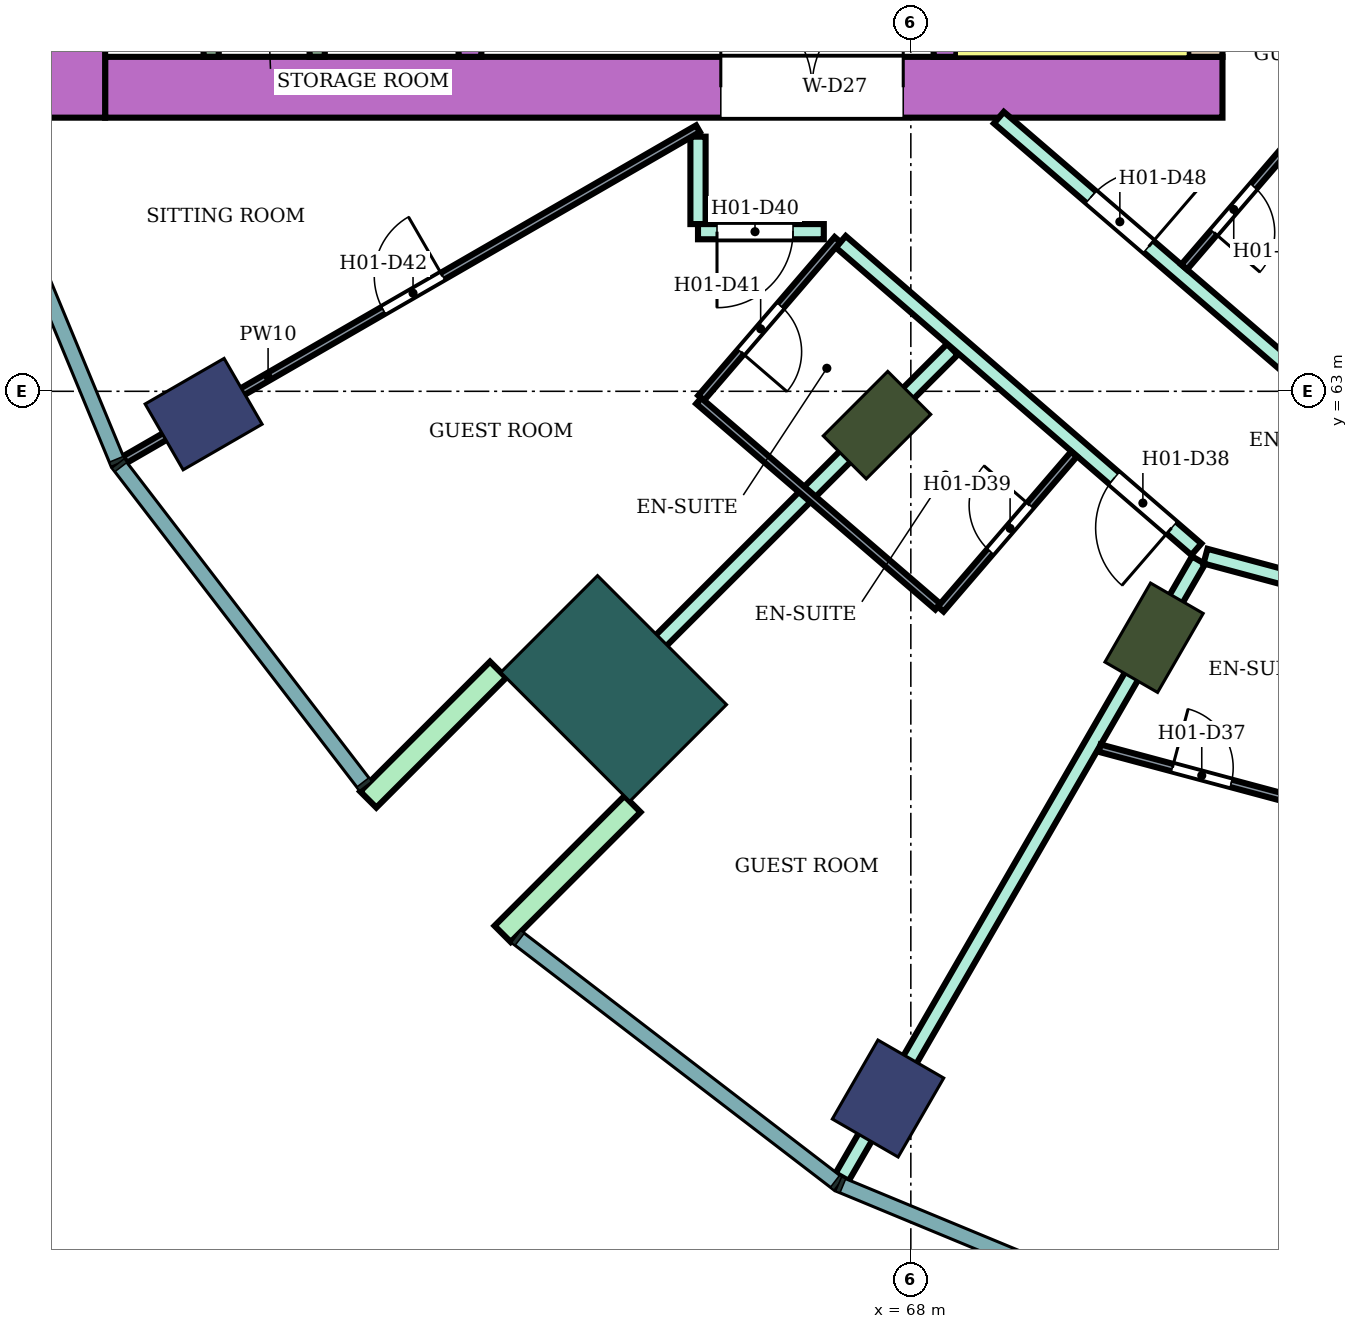
"""IFC4 building model, lengths in metres.
Left out: names, types, materials, properties, quantities, classifications, styles, units other than length and angle.
Written with IfcOpenShell. Run it as: python <this file> out.ifc"""

import sys

from ifc_helpers import new_model, si_unit, direction, frame, frame_2d, origin, origin_2d, place, context, subcontext, project, spatial, rectangle, extrude, element, fill, save


model = new_model("IFC4")
c1 = context("Model", 3, precision=1e-05, world=origin(), true_north=direction((0.0, 1.0)))
c2 = subcontext(c1, "Body", "Model", "MODEL_VIEW")
j1 = project(units=[si_unit("LENGTHUNIT", "METRE"), si_unit("PLANEANGLEUNIT", "RADIAN")], contexts=[c1])
p1 = place(None, origin())
s1 = spatial("IfcSite", under=j1, at=p1, CompositionType="ELEMENT")
p2 = place(p1, origin())
s2 = spatial("IfcBuilding", under=s1, at=p2, CompositionType="ELEMENT")
p3 = place(p2, frame((0.0, 0.0, 32.6)))
s3 = spatial("IfcBuildingStorey", under=s2, at=p3, CompositionType="ELEMENT", Elevation=32.6)
for number, where, z_axis, x_axis in (
    (1, (58.696, 62.7, 0.0), (0.0, 0.0, 1.0), (-0.866, -0.5, 0.0)),
    (2, (67.7, 53.696, 0.0), (0.0, 0.0, 1.0), (-0.5, -0.866, 0.0)),
):
    element("IfcColumn", number, at=place(p3, frame(where, z_axis=z_axis, x_axis=x_axis)), inside=s3, PredefinedType="COLUMN", context=c2, shape_type="SweptSolid", body=[
        extrude(rectangle(XDim=1.2, YDim=1.0, at=origin_2d()), origin(), (0.0, 0.0, 1.0), 3.8),
    ])
for number, where, z_axis, x_axis in (
    (3, (67.555, 62.555, 0.0), (0.0, 0.0, 1.0), (-0.707, -0.707, 0.0)),
    (4, (71.2, 59.758, 0.0), (0.0, 0.0, 1.0), (-0.5, -0.866, 0.0)),
):
    element("IfcColumn", number, at=place(p3, frame(where, z_axis=z_axis, x_axis=x_axis)), inside=s3, PredefinedType="COLUMN", context=c2, shape_type="SweptSolid", body=[
        extrude(rectangle(XDim=1.2, YDim=0.8, at=origin_2d()), origin(), (0.0, 0.0, 1.0), 3.8),
    ])
p4 = place(p3, frame((64.09, 59.09, 0.0), z_axis=(0.0, 0.0, 1.0), x_axis=(-0.707106781187, -0.707106781187, 0.0)))
e5 = element("IfcColumn", 5, at=p4, inside=s3, PredefinedType="COLUMN", context=c2, shape_type="SweptSolid", body=[
    extrude(rectangle(XDim=1.8, YDim=2.4, at=origin_2d()), origin(), (0.0, 0.0, 1.0), 3.8),
])
p5 = place(p3, frame((72.1, 67.0, 0.0), z_axis=(0.0, 0.0, 1.0), x_axis=(-1.0, 0.0, 0.0)))
e6 = element("IfcWall", 6, at=p5, inside=s3, PredefinedType="SHEAR", context=c2, shape_type="SweptSolid", body=[
    extrude(rectangle(XDim=14.7, YDim=0.8, at=frame_2d((7.35, 0.0))), origin(), (0.0, 0.0, 1.0), 3.48),
])
p6 = place(p5, frame((4.2, 0.0, 0.0)))
e7 = element("IfcOpeningElement", 7, at=p6, cuts=e6, PredefinedType="OPENING", context=c2, shape_type="SweptSolid", body=[
    extrude(rectangle(XDim=2.4, YDim=2.4, at=frame_2d((1.2, 1.2))), frame((0.0, 0.41, 0.0), z_axis=(0.0, -1.0, 0.0), x_axis=(1.0, 0.0, 0.0)), (0.0, 0.0, 1.0), 0.82),
])
p7 = place(p3, frame((71.875, 75.0, 0.0), z_axis=(0.0, 0.0, 1.0), x_axis=(0.0, -1.0, 0.0)))
e8 = element("IfcWall", 8, at=p7, inside=s3, PredefinedType="SHEAR", context=c2, shape_type="SweptSolid", body=[
    extrude(rectangle(XDim=7.6, YDim=0.45, at=frame_2d((3.8, 0.0))), origin(), (0.0, 0.0, 1.0), 3.48),
])
p8 = place(p3, frame((57.0, 83.4, 0.0), z_axis=(0.0, 0.0, 1.0), x_axis=(0.0, -1.0, 0.0)))
e9 = element("IfcWall", 9, at=p8, inside=s3, PredefinedType="SHEAR", context=c2, shape_type="SweptSolid", body=[
    extrude(rectangle(XDim=16.8, YDim=0.8, at=frame_2d((8.4, 0.0))), origin(), (0.0, 0.0, 1.0), 3.48),
])
p9 = place(p3, frame((68.45, 75.0, 0.0), z_axis=(0.0, 0.0, 1.0), x_axis=(0.0, -1.0, 0.0)))
e10 = element("IfcWall", 10, at=p9, inside=s3, PredefinedType="SHEAR", context=c2, shape_type="SweptSolid", body=[
    extrude(rectangle(XDim=7.6, YDim=0.3, at=frame_2d((3.8, 0.0))), origin(), (0.0, 0.0, 1.0), 3.48),
])
p10 = place(p9, frame((1.85, 0.0, 0.0)))
e11 = element("IfcOpeningElement", 11, at=p10, cuts=e10, PredefinedType="OPENING", context=c2, shape_type="SweptSolid", body=[
    extrude(rectangle(XDim=0.9, YDim=2.1, at=frame_2d((0.45, 1.05))), frame((0.0, 0.16, 0.0), z_axis=(0.0, -1.0, 0.0), x_axis=(1.0, 0.0, 0.0)), (0.0, 0.0, 1.0), 0.32),
])
p11 = place(p3, frame((62.2, 71.4, 0.0), z_axis=(0.0, 0.0, 1.0), x_axis=(0.0, -1.0, 0.0)))
e12 = element("IfcWall", 12, at=p11, inside=s3, PredefinedType="SHEAR", context=c2, shape_type="SweptSolid", body=[
    extrude(rectangle(XDim=4.0, YDim=0.3, at=frame_2d((2.0, 0.0))), origin(), (0.0, 0.0, 1.0), 3.48),
])
for number, where, z_axis, x_axis in (
    (13, (62.57, 59.338, 0.0), (0.0, 0.0, 1.0), (-0.707, -0.707, 0.0)),
    (14, (64.338, 57.57, 0.0), (0.0, 0.0, 1.0), (-0.707, -0.707, 0.0)),
):
    element("IfcWall", number, at=place(p3, frame(where, z_axis=z_axis, x_axis=x_axis)), inside=s3, PredefinedType="NOTDEFINED", context=c2, shape_type="SweptSolid", body=[
        extrude(rectangle(XDim=2.416, YDim=0.3, at=frame_2d((1.208, 0.0))), origin(), (0.0, 0.0, 1.0), 3.8),
    ])
p12 = place(p3, frame((63.592, 58.599, 0.0), z_axis=(0.0, 0.0, 1.0), x_axis=(0.707228748718, 0.706984792613, 0.0)))
e15 = element("IfcWall", 15, at=p12, inside=s3, PredefinedType="PARTITIONING", context=c2, shape_type="SweptSolid", body=[
    extrude(rectangle(XDim=7.005, YDim=0.2, at=frame_2d((3.503, 0.0))), origin(), (0.0, 0.0, 1.0), 3.35),
])
p13 = place(p3, frame((65.2, 65.2, 0.0), z_axis=(0.0, 0.0, 1.0), x_axis=(0.0, 1.0, 0.0)))
e16 = element("IfcWall", 16, at=p13, inside=s3, PredefinedType="PARTITIONING", context=c2, shape_type="SweptSolid", body=[
    extrude(rectangle(XDim=1.15, YDim=0.2, at=frame_2d((0.575, 0.0))), origin(), (0.0, 0.0, 1.0), 3.35),
])
p14 = place(p3, frame((65.2, 65.1, 0.0), z_axis=(0.0, 0.0, 1.0), x_axis=(1.0, 0.0, 0.0)))
e17 = element("IfcWall", 17, at=p14, inside=s3, PredefinedType="PARTITIONING", context=c2, shape_type="SweptSolid", body=[
    extrude(rectangle(XDim=1.655, YDim=0.2, at=frame_2d((0.828, 0.0))), origin(), (0.0, 0.0, 1.0), 3.35),
])
p15 = place(p14, frame((0.25, 0.0, 0.0)))
e18 = element("IfcOpeningElement", 18, at=p15, cuts=e17, PredefinedType="OPENING", context=c2, shape_type="SweptSolid", body=[
    extrude(rectangle(XDim=1.0, YDim=2.1, at=frame_2d((0.5, 1.05))), frame((0.0, 0.11, 0.0), z_axis=(0.0, -1.0, 0.0), x_axis=(1.0, 0.0, 0.0)), (0.0, 0.0, 1.0), 0.22),
])
p16 = place(p3, frame((67.078, 64.968, 0.0), z_axis=(0.0, 0.0, 1.0), x_axis=(0.756371089567, -0.654142778656, 0.0)))
e19 = element("IfcWall", 19, at=p16, inside=s3, PredefinedType="PARTITIONING", context=c2, shape_type="SweptSolid", body=[
    extrude(rectangle(XDim=6.185, YDim=0.2, at=frame_2d((3.093, 0.0))), origin(), (0.0, 0.0, 1.0), 3.35),
])
p17 = place(p16, frame((4.755, 0.0, 0.0)))
e20 = element("IfcOpeningElement", 20, at=p17, cuts=e19, PredefinedType="OPENING", context=c2, shape_type="SweptSolid", body=[
    extrude(rectangle(XDim=1.0, YDim=2.1, at=frame_2d((0.5, 1.05))), frame((0.0, 0.11, 0.0), z_axis=(0.0, -1.0, 0.0), x_axis=(1.0, 0.0, 0.0)), (0.0, 0.0, 1.0), 0.22),
])
p18 = place(p3, frame((67.096, 52.662, 0.0), z_axis=(0.0, 0.0, 1.0), x_axis=(0.500242450002, 0.865885379953, 0.0)))
e21 = element("IfcWall", 21, at=p18, inside=s3, PredefinedType="PARTITIONING", context=c2, shape_type="SweptSolid", body=[
    extrude(rectangle(XDim=9.374, YDim=0.2, at=frame_2d((4.687, 0.0))), origin(), (0.0, 0.0, 1.0), 3.35),
])
p19 = place(p3, frame((69.158, 66.6, 0.0), z_axis=(0.0, 0.0, 1.0), x_axis=(0.757976058094, -0.652282373943, 0.0)))
e22 = element("IfcWall", 22, at=p19, inside=s3, PredefinedType="PARTITIONING", context=c2, shape_type="SweptSolid", body=[
    extrude(rectangle(XDim=5.16, YDim=0.2, at=frame_2d((2.58, 0.0))), origin(), (0.0, 0.0, 1.0), 3.35),
])
p20 = place(p19, frame((1.6, 0.0, 0.0)))
e23 = element("IfcOpeningElement", 23, at=p20, cuts=e22, PredefinedType="OPENING", context=c2, shape_type="SweptSolid", body=[
    extrude(rectangle(XDim=1.0, YDim=2.1, at=frame_2d((0.5, 1.05))), frame((0.0, 0.11, 0.0), z_axis=(0.0, -1.0, 0.0), x_axis=(1.0, 0.0, 0.0)), (0.0, 0.0, 1.0), 0.22),
])
p21 = place(p3, frame((71.877, 60.831, 0.0), z_axis=(0.0, 0.0, 1.0), x_axis=(0.965852509869, -0.259092510851, 0.0)))
e24 = element("IfcWall", 24, at=p21, inside=s3, PredefinedType="PARTITIONING", context=c2, shape_type="SweptSolid", body=[
    extrude(rectangle(XDim=8.32, YDim=0.2, at=frame_2d((4.16, 0.0))), origin(), (0.0, 0.0, 1.0), 3.35),
])
p22 = place(p21, frame((6.86, 0.0, 0.0)))
e25 = element("IfcOpeningElement", 25, at=p22, cuts=e24, PredefinedType="OPENING", context=c2, shape_type="SweptSolid", body=[
    extrude(rectangle(XDim=1.0, YDim=2.1, at=frame_2d((0.5, 1.05))), frame((0.0, 0.11, 0.0), z_axis=(0.0, -1.0, 0.0), x_axis=(1.0, 0.0, 0.0)), (0.0, 0.0, 1.0), 0.22),
])
p23 = place(p3, frame((57.659, 62.101, 0.0), z_axis=(0.0, 0.0, 1.0), x_axis=(0.86602264145, 0.500004784474, 0.0)))
e26 = element("IfcWall", 26, at=p23, inside=s3, PredefinedType="PARTITIONING", context=c2, shape_type="SweptSolid", body=[
    extrude(rectangle(XDim=8.708, YDim=0.1, at=frame_2d((4.354, 0.0))), origin(), (0.0, 0.0, 1.0), 3.35),
])
p24 = place(p23, frame((3.929, 0.0, 0.0)))
e27 = element("IfcOpeningElement", 27, at=p24, cuts=e26, PredefinedType="OPENING", context=c2, shape_type="SweptSolid", body=[
    extrude(rectangle(XDim=0.9, YDim=2.1, at=frame_2d((0.45, 1.05))), frame((0.0, 0.06, 0.0), z_axis=(0.0, -1.0, 0.0), x_axis=(1.0, 0.0, 0.0)), (0.0, 0.0, 1.0), 0.12),
])
p25 = place(p3, frame((65.242, 62.912, 0.0), z_axis=(0.0, 0.0, 1.0), x_axis=(0.652069888227, 0.758158862553, 0.0)))
e28 = element("IfcWall", 28, at=p25, inside=s3, PredefinedType="PARTITIONING", context=c2, shape_type="SweptSolid", body=[
    extrude(rectangle(XDim=2.75, YDim=0.1, at=frame_2d((1.375, 0.0))), origin(), (0.0, 0.0, 1.0), 3.35),
])
p26 = place(p25, frame((0.8, 0.0, 0.0)))
e29 = element("IfcOpeningElement", 29, at=p26, cuts=e28, PredefinedType="OPENING", context=c2, shape_type="SweptSolid", body=[
    extrude(rectangle(XDim=0.8, YDim=2.1, at=frame_2d((0.4, 1.05))), frame((0.0, 0.06, 0.0), z_axis=(0.0, -1.0, 0.0), x_axis=(1.0, 0.0, 0.0)), (0.0, 0.0, 1.0), 0.12),
])
p27 = place(p3, frame((65.209, 62.875, 0.0), z_axis=(0.0, 0.0, 1.0), x_axis=(0.757930378138, -0.652335451969, 0.0)))
e30 = element("IfcWall", 30, at=p27, inside=s3, PredefinedType="PARTITIONING", context=c2, shape_type="SweptSolid", body=[
    extrude(rectangle(XDim=4.15, YDim=0.1, at=frame_2d((2.075, 0.0))), origin(), (0.0, 0.0, 1.0), 3.35),
])
p28 = place(p3, frame((68.393, 60.135, 0.0), z_axis=(0.0, 0.0, 1.0), x_axis=(0.652061182569, 0.758166349944, 0.0)))
e31 = element("IfcWall", 31, at=p28, inside=s3, PredefinedType="PARTITIONING", context=c2, shape_type="SweptSolid", body=[
    extrude(rectangle(XDim=2.69, YDim=0.1, at=frame_2d((1.345, 0.0))), origin(), (0.0, 0.0, 1.0), 3.35),
])
p29 = place(p28, frame((1.0, 0.0, 0.0)))
e32 = element("IfcOpeningElement", 32, at=p29, cuts=e31, PredefinedType="OPENING", context=c2, shape_type="SweptSolid", body=[
    extrude(rectangle(XDim=0.8, YDim=2.1, at=frame_2d((0.4, 1.05))), frame((0.0, 0.06, 0.0), z_axis=(0.0, -1.0, 0.0), x_axis=(1.0, 0.0, 0.0)), (0.0, 0.0, 1.0), 0.12),
])
p30 = place(p3, frame((70.484, 58.305, 0.0), z_axis=(0.0, 0.0, 1.0), x_axis=(0.965904703781, -0.258897862512, 0.0)))
e33 = element("IfcWall", 33, at=p30, inside=s3, PredefinedType="PARTITIONING", context=c2, shape_type="SweptSolid", body=[
    extrude(rectangle(XDim=2.841, YDim=0.1, at=frame_2d((1.421, 0.0))), origin(), (0.0, 0.0, 1.0), 3.35),
])
p31 = place(p30, frame((0.99, 0.0, 0.0)))
e34 = element("IfcOpeningElement", 34, at=p31, cuts=e33, PredefinedType="OPENING", context=c2, shape_type="SweptSolid", body=[
    extrude(rectangle(XDim=0.8, YDim=2.1, at=frame_2d((0.4, 1.05))), frame((0.0, 0.06, 0.0), z_axis=(0.0, -1.0, 0.0), x_axis=(1.0, 0.0, 0.0)), (0.0, 0.0, 1.0), 0.12),
])
p32 = place(p3, frame((71.596, 64.635, 0.0), z_axis=(0.0, 0.0, 1.0), x_axis=(0.652285007511, 0.757973791748, 0.0)))
e35 = element("IfcWall", 35, at=p32, inside=s3, PredefinedType="PARTITIONING", context=c2, shape_type="SweptSolid", body=[
    extrude(rectangle(XDim=2.65, YDim=0.1, at=frame_2d((1.325, 0.0))), origin(), (0.0, 0.0, 1.0), 3.35),
])
p33 = place(p32, frame((0.6, 0.0, 0.0)))
e36 = element("IfcOpeningElement", 36, at=p33, cuts=e35, PredefinedType="OPENING", context=c2, shape_type="SweptSolid", body=[
    extrude(rectangle(XDim=0.8, YDim=2.1, at=frame_2d((0.4, 1.05))), frame((0.0, 0.06, 0.0), z_axis=(0.0, -1.0, 0.0), x_axis=(1.0, 0.0, 0.0)), (0.0, 0.0, 1.0), 0.12),
])
for number, where, z_axis, x_axis in (
    (37, (60.19, 71.1, 0.0), (0.0, 0.0, 1.0), (0.0, -1.0, 0.0)),
    (38, (58.795, 71.1, 0.0), (0.0, 0.0, 1.0), (0.0, -1.0, 0.0)),
):
    element("IfcWall", number, at=place(p3, frame(where, z_axis=z_axis, x_axis=x_axis)), inside=s3, PredefinedType="PARTITIONING", context=c2, shape_type="SweptSolid", body=[
        extrude(rectangle(XDim=3.7, YDim=0.2, at=frame_2d((1.85, 0.0))), origin(), (0.0, 0.0, 1.0), 3.48),
    ])
p34 = place(p31, origin())
e39 = element("IfcDoor", 39, at=p34, inside=s3, OperationType="SINGLE_SWING_LEFT", PredefinedType="DOOR", context=c2, shape_type="SweptSolid", body=[
    extrude(rectangle(XDim=0.8, YDim=2.1, at=frame_2d((0.4, 1.05))), frame((0.0, 0.025, 0.0), z_axis=(0.0, -1.0, 0.0), x_axis=(1.0, 0.0, 0.0)), (0.0, 0.0, 1.0), 0.05),
])
fill(e34, e39)
p35 = place(p17, frame((1.0, 0.0, 0.0), z_axis=(0.0, 0.0, 1.0), x_axis=(-1.0, 0.0, 0.0)))
e40 = element("IfcDoor", 40, at=p35, inside=s3, OperationType="SINGLE_SWING_LEFT", PredefinedType="DOOR", context=c2, shape_type="SweptSolid", body=[
    extrude(rectangle(XDim=1.0, YDim=2.1, at=frame_2d((0.5, 1.05))), frame((0.0, 0.025, 0.0), z_axis=(0.0, -1.0, 0.0), x_axis=(1.0, 0.0, 0.0)), (0.0, 0.0, 1.0), 0.05),
])
fill(e20, e40)
p36 = place(p29, origin())
e41 = element("IfcDoor", 41, at=p36, inside=s3, OperationType="SINGLE_SWING_RIGHT", PredefinedType="DOOR", context=c2, shape_type="SweptSolid", body=[
    extrude(rectangle(XDim=0.8, YDim=2.1, at=frame_2d((0.4, 1.05))), frame((0.0, 0.025, 0.0), z_axis=(0.0, -1.0, 0.0), x_axis=(1.0, 0.0, 0.0)), (0.0, 0.0, 1.0), 0.05),
])
fill(e32, e41)
p37 = place(p15, frame((1.0, 0.0, 0.0), z_axis=(0.0, 0.0, 1.0), x_axis=(-1.0, 0.0, 0.0)))
e42 = element("IfcDoor", 42, at=p37, inside=s3, OperationType="SINGLE_SWING_RIGHT", PredefinedType="DOOR", context=c2, shape_type="SweptSolid", body=[
    extrude(rectangle(XDim=1.0, YDim=2.1, at=frame_2d((0.5, 1.05))), frame((0.0, 0.025, 0.0), z_axis=(0.0, -1.0, 0.0), x_axis=(1.0, 0.0, 0.0)), (0.0, 0.0, 1.0), 0.05),
])
fill(e18, e42)
p38 = place(p26, frame((0.8, 0.0, 0.0), z_axis=(0.0, 0.0, 1.0), x_axis=(-1.0, 0.0, 0.0)))
e43 = element("IfcDoor", 43, at=p38, inside=s3, OperationType="SINGLE_SWING_RIGHT", PredefinedType="DOOR", context=c2, shape_type="SweptSolid", body=[
    extrude(rectangle(XDim=0.8, YDim=2.1, at=frame_2d((0.4, 1.05))), frame((0.0, 0.025, 0.0), z_axis=(0.0, -1.0, 0.0), x_axis=(1.0, 0.0, 0.0)), (0.0, 0.0, 1.0), 0.05),
])
fill(e29, e43)
p39 = place(p24, origin())
e44 = element("IfcDoor", 44, at=p39, inside=s3, OperationType="SINGLE_SWING_RIGHT", PredefinedType="DOOR", context=c2, shape_type="SweptSolid", body=[
    extrude(rectangle(XDim=0.9, YDim=2.1, at=frame_2d((0.45, 1.05))), frame((0.0, 0.025, 0.0), z_axis=(0.0, -1.0, 0.0), x_axis=(1.0, 0.0, 0.0)), (0.0, 0.0, 1.0), 0.05),
])
fill(e27, e44)
p40 = place(p20, origin())
e45 = element("IfcDoor", 45, at=p40, inside=s3, OperationType="SINGLE_SWING_RIGHT", PredefinedType="DOOR", context=c2, shape_type="SweptSolid", body=[
    extrude(rectangle(XDim=1.0, YDim=2.1, at=frame_2d((0.5, 1.05))), frame((0.0, 0.025, 0.0), z_axis=(0.0, -1.0, 0.0), x_axis=(1.0, 0.0, 0.0)), (0.0, 0.0, 1.0), 0.05),
])
fill(e23, e45)
p41 = place(p33, frame((0.8, 0.0, 0.0), z_axis=(0.0, 0.0, 1.0), x_axis=(-1.0, 0.0, 0.0)))
e46 = element("IfcDoor", 46, at=p41, inside=s3, OperationType="SINGLE_SWING_RIGHT", PredefinedType="DOOR", context=c2, shape_type="SweptSolid", body=[
    extrude(rectangle(XDim=0.8, YDim=2.1, at=frame_2d((0.4, 1.05))), frame((0.0, 0.025, 0.0), z_axis=(0.0, -1.0, 0.0), x_axis=(1.0, 0.0, 0.0)), (0.0, 0.0, 1.0), 0.05),
])
fill(e36, e46)
p42 = place(p6, frame((2.4, 0.0, 0.0), z_axis=(0.0, 0.0, 1.0), x_axis=(-1.0, 0.0, 0.0)))
e47 = element("IfcDoor", 47, at=p42, inside=s3, OperationType="DOUBLE_DOOR_SINGLE_SWING", PredefinedType="DOOR", context=c2, shape_type="SweptSolid", body=[
    extrude(rectangle(XDim=2.4, YDim=2.4, at=frame_2d((1.2, 1.2))), frame((0.0, 0.025, 0.0), z_axis=(0.0, -1.0, 0.0), x_axis=(1.0, 0.0, 0.0)), (0.0, 0.0, 1.0), 0.05),
])
fill(e7, e47)
save(model, sys.argv[1])
